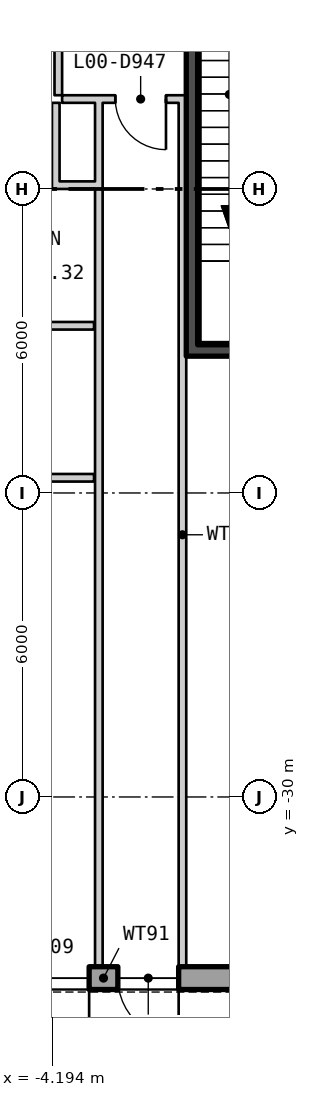
"""IFC4 building model, lengths in metres.
Left out: names, types, materials, properties, quantities, classifications, styles, units other than length and angle.
Written with IfcOpenShell. Run it as: python <this file> out.ifc"""

import sys

from ifc_helpers import new_model, si_unit, direction, frame, frame_2d, origin, place, context, subcontext, project, spatial, polyline, rectangle, outline, extrude, element, fill, save


model = new_model("IFC4")
c1 = context("Model", 3, precision=1e-05, world=origin(), true_north=direction((0.0, 1.0)))
c2 = subcontext(c1, "Body", "Model", "MODEL_VIEW")
j1 = project(units=[si_unit("LENGTHUNIT", "METRE"), si_unit("PLANEANGLEUNIT", "RADIAN")], contexts=[c1])
p1 = place(None, origin())
s1 = spatial("IfcSite", under=j1, at=p1, CompositionType="ELEMENT")
p2 = place(p1, origin())
s2 = spatial("IfcBuilding", under=s1, at=p2, CompositionType="ELEMENT")
p3 = place(p2, origin())
s3 = spatial("IfcBuildingStorey", under=s2, at=p3, CompositionType="ELEMENT", Elevation=0.0)
p4 = place(p3, frame((-38.775, -33.575, 5.4), z_axis=(0.0, 0.0, 1.0), x_axis=(1.0, 0.0, 0.0)))
e1 = element("IfcWall", 1, at=p4, inside=s3, PredefinedType="SOLIDWALL", context=c2, shape_type="SweptSolid", body=[
    extrude(outline(polyline([(-0.225, -0.225), (77.775, -0.225), (77.325, 0.225), (0.225, 0.225), (-0.225, -0.225)])), origin(), (0.0, 0.0, 1.0), 2.6),
])
p5 = place(p3, frame((-5.767, -33.575, -0.4), z_axis=(0.0, 0.0, 1.0), x_axis=(1.0, 0.0, 0.0)))
e2 = element("IfcWall", 2, at=p5, inside=s3, PredefinedType="SOLIDWALL", context=c2, shape_type="SweptSolid", body=[
    extrude(outline(polyline([(0.0, -0.225), (5.167, -0.225), (5.167, 0.225), (0.0, 0.225), (0.0, -0.225)])), origin(), (0.0, 0.0, 1.0), 5.8),
])
p6 = place(p5, frame((2.867, 0.0, 0.4)))
e3 = element("IfcOpeningElement", 3, at=p6, cuts=e2, PredefinedType="OPENING", context=c2, shape_type="SweptSolid", body=[
    extrude(rectangle(XDim=1.2, YDim=2.4, at=frame_2d((0.6, 1.2))), frame((0.0, 0.235, 0.0), z_axis=(0.0, -1.0, 0.0), x_axis=(1.0, 0.0, 0.0)), (0.0, 0.0, 1.0), 0.47),
])
p7 = place(p5, frame((0.1, 0.0, 0.4)))
e4 = element("IfcOpeningElement", 4, at=p7, cuts=e2, PredefinedType="OPENING", context=c2, shape_type="SweptSolid", body=[
    extrude(rectangle(XDim=2.2, YDim=3.0, at=frame_2d((1.1, 1.5))), frame((0.0, 0.235, 0.0), z_axis=(0.0, -1.0, 0.0), x_axis=(1.0, 0.0, 0.0)), (0.0, 0.0, 1.0), 0.47),
])
p8 = place(p3, frame((-1.438, -21.075, 0.0), z_axis=(0.0, 0.0, 1.0), x_axis=(0.0, 1.0, 0.0)))
e5 = element("IfcWall", 5, at=p8, inside=s3, PredefinedType="SHEAR", context=c2, shape_type="SweptSolid", body=[
    extrude(rectangle(XDim=7.25, YDim=0.225, at=frame_2d((3.625, 0.0))), origin(), (0.0, 0.0, 1.0), 8.18),
])
p9 = place(p8, frame((5.94, 0.0, 0.0)))
e6 = element("IfcOpeningElement", 6, at=p9, cuts=e5, PredefinedType="OPENING", context=c2, shape_type="SweptSolid", body=[
    extrude(rectangle(XDim=1.0, YDim=2.1, at=frame_2d((0.5, 1.05))), frame((0.0, 0.122, 0.0), z_axis=(0.0, -1.0, 0.0), x_axis=(1.0, 0.0, 0.0)), (0.0, 0.0, 1.0), 0.245),
])
p10 = place(p3, frame((-1.55, -21.188, 0.0), z_axis=(0.0, 0.0, 1.0), x_axis=(1.0, 0.0, 0.0)))
e7 = element("IfcWall", 7, at=p10, inside=s3, PredefinedType="SHEAR", context=c2, shape_type="SweptSolid", body=[
    extrude(rectangle(XDim=3.1, YDim=0.225, at=frame_2d((1.55, 0.0))), origin(), (0.0, 0.0, 1.0), 8.18),
])
p11 = place(p3, frame((-4.0, -16.225, 0.0), z_axis=(0.0, 0.0, 1.0), x_axis=(1.0, 0.0, 0.0)))
e8 = element("IfcWall", 8, at=p11, inside=s3, PredefinedType="PARTITIONING", context=c2, shape_type="SweptSolid", body=[
    extrude(rectangle(XDim=2.45, YDim=0.15, at=frame_2d((1.225, 0.0))), origin(), (0.0, 0.0, 1.0), 8.18),
])
p12 = place(p11, frame((1.05, 0.0, 0.0)))
e9 = element("IfcOpeningElement", 9, at=p12, cuts=e8, PredefinedType="OPENING", context=c2, shape_type="SweptSolid", body=[
    extrude(rectangle(XDim=1.0, YDim=2.4, at=frame_2d((0.5, 1.2))), frame((0.0, 0.085, 0.0), z_axis=(0.0, -1.0, 0.0), x_axis=(1.0, 0.0, 0.0)), (0.0, 0.0, 1.0), 0.17),
])
p13 = place(p3, frame((-4.075, -16.15, 0.0), z_axis=(0.0, 0.0, 1.0), x_axis=(0.0, 1.0, 0.0)))
e10 = element("IfcWall", 10, at=p13, inside=s3, PredefinedType="PARTITIONING", context=c2, shape_type="SweptSolid", body=[
    extrude(rectangle(XDim=2.4, YDim=0.15, at=frame_2d((1.2, 0.0))), origin(), (0.0, 0.0, 1.0), 8.18),
])
p14 = place(p3, frame((-3.275, -33.35, 0.0), z_axis=(0.0, 0.0, 1.0), x_axis=(0.0, 1.0, 0.0)))
e11 = element("IfcWall", 11, at=p14, inside=s3, PredefinedType="PARTITIONING", context=c2, shape_type="SweptSolid", body=[
    extrude(rectangle(XDim=0.45, YDim=0.15, at=frame_2d((0.225, 0.0))), origin(), (0.0, 0.0, 1.0), 8.18),
])
p15 = place(p3, frame((-3.275, -32.9, 0.0), z_axis=(0.0, 0.0, 1.0), x_axis=(0.0, 1.0, 0.0)))
e12 = element("IfcWall", 12, at=p15, inside=s3, PredefinedType="PARTITIONING", context=c2, shape_type="SweptSolid", body=[
    extrude(rectangle(XDim=16.6, YDim=0.15, at=frame_2d((8.3, 0.0))), origin(), (0.0, 0.0, 1.0), 7.58),
])
p16 = place(p3, frame((-1.625, -33.35, 0.0), z_axis=(0.0, 0.0, 1.0), x_axis=(0.0, 1.0, 0.0)))
e13 = element("IfcWall", 13, at=p16, inside=s3, PredefinedType="PARTITIONING", context=c2, shape_type="SweptSolid", body=[
    extrude(rectangle(XDim=17.05, YDim=0.15, at=frame_2d((8.525, 0.0))), origin(), (0.0, 0.0, 1.0), 8.18),
])
p17 = place(p3, frame((-4.125, -18.0, 0.0), z_axis=(0.0, 0.0, 1.0), x_axis=(0.0, 1.0, 0.0)))
e14 = element("IfcWall", 14, at=p17, inside=s3, PredefinedType="PARTITIONING", context=c2, shape_type="SweptSolid", body=[
    extrude(rectangle(XDim=1.7, YDim=0.15, at=frame_2d((0.85, 0.0))), origin(), (0.0, 0.0, 1.0), 8.18),
])
p18 = place(p3, frame((-4.05, -17.925, 0.0), z_axis=(0.0, 0.0, 1.0), x_axis=(1.0, 0.0, 0.0)))
e15 = element("IfcWall", 15, at=p18, inside=s3, PredefinedType="PARTITIONING", context=c2, shape_type="SweptSolid", body=[
    extrude(rectangle(XDim=0.7, YDim=0.15, at=frame_2d((0.35, 0.0))), origin(), (0.0, 0.0, 1.0), 8.18),
])
p19 = place(p3, frame((-6.292, -20.7, 0.0), z_axis=(0.0, 0.0, 1.0), x_axis=(1.0, 0.0, 0.0)))
e16 = element("IfcWall", 16, at=p19, inside=s3, PredefinedType="PARTITIONING", context=c2, shape_type="SweptSolid", body=[
    extrude(rectangle(XDim=2.922, YDim=0.15, at=frame_2d((1.461, 0.0))), origin(), (0.0, 0.0, 1.0), 8.18),
])
p20 = place(p3, frame((-4.485, -23.7, 0.0), z_axis=(0.0, 0.0, 1.0), x_axis=(1.0, 0.0, 0.0)))
e17 = element("IfcWall", 17, at=p20, inside=s3, PredefinedType="PARTITIONING", context=c2, shape_type="SweptSolid", body=[
    extrude(rectangle(XDim=1.115, YDim=0.15, at=frame_2d((0.557, 0.0))), origin(), (0.0, 0.0, 1.0), 8.18),
])
p21 = place(p6, frame((1.2, 0.0, 0.0), z_axis=(0.0, 0.0, 1.0), x_axis=(-1.0, 0.0, 0.0)))
e18 = element("IfcDoor", 18, at=p21, inside=s3, OperationType="SINGLE_SWING_RIGHT", PredefinedType="DOOR", context=c2, shape_type="SweptSolid", body=[
    extrude(rectangle(XDim=1.2, YDim=2.4, at=frame_2d((0.6, 1.2))), frame((0.0, 0.025, 0.0), z_axis=(0.0, -1.0, 0.0), x_axis=(1.0, 0.0, 0.0)), (0.0, 0.0, 1.0), 0.05),
])
fill(e3, e18)
p22 = place(p7, frame((2.2, 0.0, 0.0), z_axis=(0.0, 0.0, 1.0), x_axis=(-1.0, 0.0, 0.0)))
e19 = element("IfcDoor", 19, at=p22, inside=s3, OperationType="DOUBLE_DOOR_DOUBLE_SWING", PredefinedType="DOOR", context=c2, shape_type="SweptSolid", body=[
    extrude(rectangle(XDim=2.2, YDim=3.0, at=frame_2d((1.1, 1.5))), frame((0.0, 0.025, 0.0), z_axis=(0.0, -1.0, 0.0), x_axis=(1.0, 0.0, 0.0)), (0.0, 0.0, 1.0), 0.05),
])
fill(e4, e19)
p23 = place(p12, origin())
e20 = element("IfcDoor", 20, at=p23, inside=s3, OperationType="SINGLE_SWING_RIGHT", PredefinedType="DOOR", context=c2, shape_type="SweptSolid", body=[
    extrude(rectangle(XDim=1.0, YDim=2.4, at=frame_2d((0.5, 1.2))), frame((0.0, 0.025, 0.0), z_axis=(0.0, -1.0, 0.0), x_axis=(1.0, 0.0, 0.0)), (0.0, 0.0, 1.0), 0.05),
])
fill(e9, e20)
save(model, sys.argv[1])
